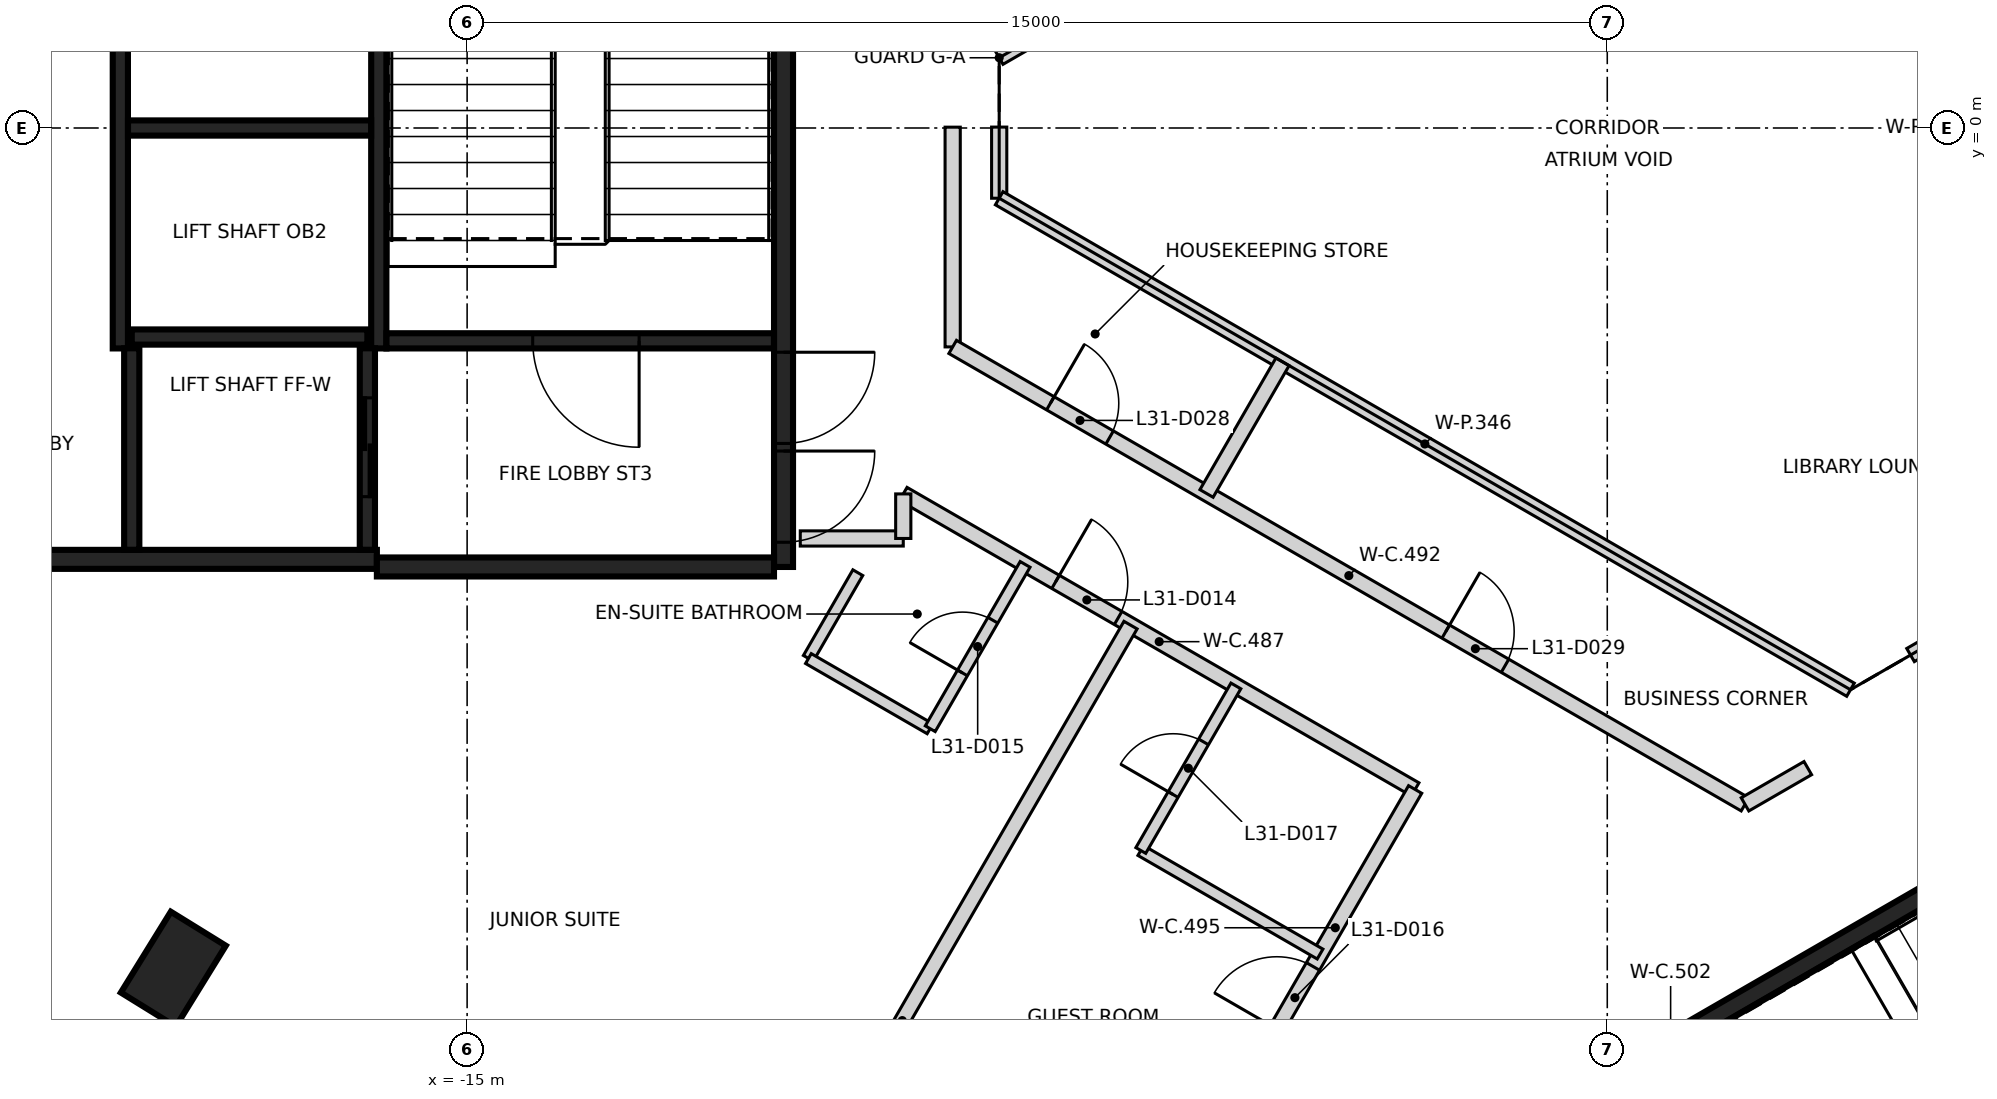
"""IFC4 building model, lengths in metres.
Left out: names, types, materials, properties, quantities, classifications, styles, units other than length and angle.
Written with IfcOpenShell. Run it as: python <this file> out.ifc"""

import sys

from ifc_helpers import new_model, si_unit, direction, frame, frame_2d, origin, origin_2d, place, context, subcontext, project, spatial, rectangle, extrude, element, fill, save


model = new_model("IFC4")
c1 = context("Model", 3, precision=1e-05, world=origin(), true_north=direction((0.0, 1.0)))
c2 = subcontext(c1, "Body", "Model", "MODEL_VIEW")
j1 = project(units=[si_unit("LENGTHUNIT", "METRE"), si_unit("PLANEANGLEUNIT", "RADIAN")], contexts=[c1])
p1 = place(None, origin())
s1 = spatial("IfcSite", under=j1, at=p1, CompositionType="ELEMENT")
p2 = place(p1, origin())
s2 = spatial("IfcBuilding", under=s1, at=p2, CompositionType="ELEMENT")
p3 = place(p2, frame((0.0, 0.0, 128.8)))
s3 = spatial("IfcBuildingStorey", under=s2, at=p3, CompositionType="ELEMENT", Elevation=128.8)
p4 = place(p3, frame((-18.865, -11.066, -0.4), z_axis=(0.0, 0.0, 1.0), x_axis=(0.52567655831, 0.850684522043, 0.0)))
e1 = element("IfcColumn", 1, at=p4, inside=s3, PredefinedType="COLUMN", context=c2, shape_type="SweptSolid", body=[
    extrude(rectangle(XDim=1.25, YDim=0.85, at=origin_2d()), origin(), (0.0, 0.0, 1.0), 3.6),
])
p5 = place(p3, frame((-10.837, 5.775, 0.0), z_axis=(0.0, 0.0, 1.0), x_axis=(0.0, -1.0, 0.0)))
e2 = element("IfcWall", 2, at=p5, inside=s3, PredefinedType="SHEAR", context=c2, shape_type="SweptSolid", body=[
    extrude(rectangle(XDim=11.55, YDim=0.25, at=frame_2d((5.775, 0.0))), origin(), (0.0, 0.0, 1.0), 3.2),
])
p6 = place(p5, frame((10.025, 0.0, 0.0)))
e3 = element("IfcOpeningElement", 3, at=p6, cuts=e2, PredefinedType="OPENING", context=c2, shape_type="SweptSolid", body=[
    extrude(rectangle(XDim=1.2, YDim=2.1, at=frame_2d((0.6, 1.05))), frame((0.0, 0.135, 0.0), z_axis=(0.0, -1.0, 0.0), x_axis=(1.0, 0.0, 0.0)), (0.0, 0.0, 1.0), 0.27),
])
p7 = place(p5, frame((8.725, 0.0, 0.0)))
e4 = element("IfcOpeningElement", 4, at=p7, cuts=e2, PredefinedType="OPENING", context=c2, shape_type="SweptSolid", body=[
    extrude(rectangle(XDim=1.2, YDim=2.1, at=frame_2d((0.6, 1.05))), frame((0.0, 0.135, 0.0), z_axis=(0.0, -1.0, 0.0), x_axis=(1.0, 0.0, 0.0)), (0.0, 0.0, 1.0), 0.27),
])
p8 = place(p3, frame((-16.187, -5.675, 0.0), z_axis=(0.0, 0.0, 1.0), x_axis=(-1.0, 0.0, 0.0)))
e5 = element("IfcWall", 5, at=p8, inside=s3, PredefinedType="SHEAR", context=c2, shape_type="SweptSolid", body=[
    extrude(rectangle(XDim=6.25, YDim=0.25, at=frame_2d((3.125, 0.0))), origin(), (0.0, 0.0, 1.0), 3.2),
])
p9 = place(p3, frame((-10.963, -5.775, 0.0), z_axis=(0.0, 0.0, 1.0), x_axis=(-1.0, 0.0, 0.0)))
e6 = element("IfcWall", 6, at=p9, inside=s3, PredefinedType="SHEAR", context=c2, shape_type="SweptSolid", body=[
    extrude(rectangle(XDim=5.225, YDim=0.25, at=frame_2d((2.612, 0.0))), origin(), (0.0, 0.0, 1.0), 3.2),
])
p10 = place(p3, frame((-16.162, 2.951, 0.0), z_axis=(0.0, 0.0, 1.0), x_axis=(0.0, -1.0, 0.0)))
e7 = element("IfcWall", 7, at=p10, inside=s3, PredefinedType="SHEAR", context=c2, shape_type="SweptSolid", body=[
    extrude(rectangle(XDim=5.851, YDim=0.2, at=frame_2d((2.925, 0.0))), origin(), (0.0, 0.0, 1.0), 3.2),
])
p11 = place(p3, frame((-19.562, -2.9, 0.0), z_axis=(0.0, 0.0, 1.0), x_axis=(0.0, 1.0, 0.0)))
e8 = element("IfcWall", 8, at=p11, inside=s3, PredefinedType="SHEAR", context=c2, shape_type="SweptSolid", body=[
    extrude(rectangle(XDim=6.1, YDim=0.2, at=frame_2d((3.05, 0.0))), origin(), (0.0, 0.0, 1.0), 3.2),
])
p12 = place(p3, frame((-10.963, -2.8, 0.0), z_axis=(0.0, 0.0, 1.0), x_axis=(-1.0, 0.0, 0.0)))
e9 = element("IfcWall", 9, at=p12, inside=s3, PredefinedType="SHEAR", context=c2, shape_type="SweptSolid", body=[
    extrude(rectangle(XDim=5.098, YDim=0.2, at=frame_2d((2.549, 0.0))), origin(), (0.0, 0.0, 1.0), 3.2),
])
p13 = place(p12, frame((1.774, 0.0, 0.0)))
e10 = element("IfcOpeningElement", 10, at=p13, cuts=e9, PredefinedType="OPENING", context=c2, shape_type="SweptSolid", body=[
    extrude(rectangle(XDim=1.4, YDim=2.1, at=frame_2d((0.7, 1.05))), frame((0.0, 0.11, 0.0), z_axis=(0.0, -1.0, 0.0), x_axis=(1.0, 0.0, 0.0)), (0.0, 0.0, 1.0), 0.22),
])
p14 = place(p3, frame((-16.263, 0.0, 0.0), z_axis=(0.0, 0.0, 1.0), x_axis=(-1.0, 0.0, 0.0)))
e11 = element("IfcWall", 11, at=p14, inside=s3, PredefinedType="SHEAR", context=c2, shape_type="SweptSolid", body=[
    extrude(rectangle(XDim=3.198, YDim=0.2, at=frame_2d((1.599, 0.0))), origin(), (0.0, 0.0, 1.0), 3.2),
])
p15 = place(p3, frame((-19.412, -2.75, 0.0), z_axis=(0.0, 0.0, 1.0), x_axis=(1.0, 0.0, 0.0)))
e12 = element("IfcWall", 12, at=p15, inside=s3, PredefinedType="SHEAR", context=c2, shape_type="SweptSolid", body=[
    extrude(rectangle(XDim=3.1, YDim=0.2, at=frame_2d((1.55, 0.0))), origin(), (0.0, 0.0, 1.0), 3.2),
])
p16 = place(p3, frame((-16.312, -2.898, 0.0), z_axis=(0.0, 0.0, 1.0), x_axis=(0.0, -1.0, 0.0)))
e13 = element("IfcWall", 13, at=p16, inside=s3, PredefinedType="SHEAR", context=c2, shape_type="SweptSolid", body=[
    extrude(rectangle(XDim=2.651, YDim=0.2, at=frame_2d((1.325, 0.0))), origin(), (0.0, 0.0, 1.0), 3.2),
])
p17 = place(p16, frame((0.652, 0.0, 0.0)))
e14 = element("IfcOpeningElement", 14, at=p17, cuts=e13, PredefinedType="OPENING", context=c2, shape_type="SweptSolid", body=[
    extrude(rectangle(XDim=1.3, YDim=2.1, at=frame_2d((0.65, 1.05))), frame((0.0, 0.11, 0.0), z_axis=(0.0, -1.0, 0.0), x_axis=(1.0, 0.0, 0.0)), (0.0, 0.0, 1.0), 0.22),
])
p18 = place(p3, frame((-19.412, -5.549, 0.0), z_axis=(0.0, 0.0, 1.0), x_axis=(0.0, 1.0, 0.0)))
e15 = element("IfcWall", 15, at=p18, inside=s3, PredefinedType="SHEAR", context=c2, shape_type="SweptSolid", body=[
    extrude(rectangle(XDim=2.651, YDim=0.2, at=frame_2d((1.325, 0.0))), origin(), (0.0, 0.0, 1.0), 3.2),
])
p19 = place(p3, frame((0.417, -12.273, 0.0), z_axis=(0.0, 0.0, 1.0), x_axis=(0.866021906294, 0.500006057782, 0.0)))
e16 = element("IfcWall", 16, at=p19, inside=s3, PredefinedType="SHEAR", context=c2, shape_type="SweptSolid", body=[
    extrude(rectangle(XDim=11.55, YDim=0.25, at=frame_2d((5.775, 0.0))), origin(), (0.0, 0.0, 1.0), 3.2),
])
p20 = place(p19, frame((10.025, 0.0, 0.0)))
e17 = element("IfcOpeningElement", 17, at=p20, cuts=e16, PredefinedType="OPENING", context=c2, shape_type="SweptSolid", body=[
    extrude(rectangle(XDim=1.2, YDim=2.1, at=frame_2d((0.6, 1.05))), frame((0.0, 0.135, 0.0), z_axis=(0.0, -1.0, 0.0), x_axis=(1.0, 0.0, 0.0)), (0.0, 0.0, 1.0), 0.27),
])
p21 = place(p19, frame((8.725, 0.0, 0.0)))
e18 = element("IfcOpeningElement", 18, at=p21, cuts=e16, PredefinedType="OPENING", context=c2, shape_type="SweptSolid", body=[
    extrude(rectangle(XDim=1.2, YDim=2.1, at=frame_2d((0.6, 1.05))), frame((0.0, 0.135, 0.0), z_axis=(0.0, -1.0, 0.0), x_axis=(1.0, 0.0, 0.0)), (0.0, 0.0, 1.0), 0.27),
])
p22 = place(p3, frame((-10.617, -5.4, 0.0), z_axis=(0.0, 0.0, 1.0), x_axis=(1.0, 0.0, 0.0)))
e19 = element("IfcWall", 19, at=p22, inside=s3, PredefinedType="PARTITIONING", context=c2, shape_type="SweptSolid", body=[
    extrude(rectangle(XDim=1.355, YDim=0.2, at=frame_2d((0.677, 0.0))), origin(), (0.0, 0.0, 1.0), 3.2),
])
p23 = place(p3, frame((-9.262, -4.814, 0.0), z_axis=(0.0, 0.0, 1.0), x_axis=(0.866109782156, -0.499853823887, 0.0)))
e20 = element("IfcWall", 20, at=p23, inside=s3, PredefinedType="PARTITIONING", context=c2, shape_type="SweptSolid", body=[
    extrude(rectangle(XDim=7.776, YDim=0.2, at=frame_2d((3.888, 0.0))), origin(), (0.0, 0.0, 1.0), 3.2),
])
p24 = place(p23, frame((2.314, 0.0, 0.0)))
e21 = element("IfcOpeningElement", 21, at=p24, cuts=e20, PredefinedType="OPENING", context=c2, shape_type="SweptSolid", body=[
    extrude(rectangle(XDim=0.95, YDim=2.1, at=frame_2d((0.475, 1.05))), frame((0.0, 0.11, 0.0), z_axis=(0.0, -1.0, 0.0), x_axis=(1.0, 0.0, 0.0)), (0.0, 0.0, 1.0), 0.22),
])
p25 = place(p3, frame((-9.262, -5.4, 0.0), z_axis=(0.0, 0.0, 1.0), x_axis=(0.0, 1.0, 0.0)))
e22 = element("IfcWall", 22, at=p25, inside=s3, PredefinedType="PARTITIONING", context=c2, shape_type="SweptSolid", body=[
    extrude(rectangle(XDim=0.586, YDim=0.2, at=frame_2d((0.293, 0.0))), origin(), (0.0, 0.0, 1.0), 3.2),
])
p26 = place(p3, frame((-8.612, -2.88, 0.0), z_axis=(0.0, 0.0, 1.0), x_axis=(0.0, 1.0, 0.0)))
e23 = element("IfcWall", 23, at=p26, inside=s3, PredefinedType="PARTITIONING", context=c2, shape_type="SweptSolid", body=[
    extrude(rectangle(XDim=2.891, YDim=0.2, at=frame_2d((1.445, 0.0))), origin(), (0.0, 0.0, 1.0), 2.3),
])
p27 = place(p3, frame((-8.612, -2.88, 0.0), z_axis=(0.0, 0.0, 1.0), x_axis=(0.866035279512, -0.499982894348, 0.0)))
e24 = element("IfcWall", 24, at=p27, inside=s3, PredefinedType="PARTITIONING", context=c2, shape_type="SweptSolid", body=[
    extrude(rectangle(XDim=12.037, YDim=0.2, at=frame_2d((6.018, 0.0))), origin(), (0.0, 0.0, 1.0), 3.2),
])
p28 = place(p27, frame((1.484, 0.0, 0.0)))
e25 = element("IfcOpeningElement", 25, at=p28, cuts=e24, PredefinedType="OPENING", context=c2, shape_type="SweptSolid", body=[
    extrude(rectangle(XDim=0.9, YDim=2.1, at=frame_2d((0.45, 1.05))), frame((0.0, 0.11, 0.0), z_axis=(0.0, -1.0, 0.0), x_axis=(1.0, 0.0, 0.0)), (0.0, 0.0, 1.0), 0.22),
])
p29 = place(p27, frame((7.491, 0.0, 0.0)))
e26 = element("IfcOpeningElement", 26, at=p29, cuts=e24, PredefinedType="OPENING", context=c2, shape_type="SweptSolid", body=[
    extrude(rectangle(XDim=0.9, YDim=2.1, at=frame_2d((0.45, 1.05))), frame((0.0, 0.11, 0.0), z_axis=(0.0, -1.0, 0.0), x_axis=(1.0, 0.0, 0.0)), (0.0, 0.0, 1.0), 0.22),
])
p30 = place(p3, frame((-4.629, -12.341, 0.0), z_axis=(0.0, 0.0, 1.0), x_axis=(0.500069467685, 0.865985292883, 0.0)))
e27 = element("IfcWall", 27, at=p30, inside=s3, PredefinedType="PARTITIONING", context=c2, shape_type="SweptSolid", body=[
    extrude(rectangle(XDim=4.202, YDim=0.2, at=frame_2d((2.101, 0.0))), origin(), (0.0, 0.0, 1.0), 3.2),
])
p31 = place(p30, frame((0.564, 0.0, 0.0)))
e28 = element("IfcOpeningElement", 28, at=p31, cuts=e27, PredefinedType="OPENING", context=c2, shape_type="SweptSolid", body=[
    extrude(rectangle(XDim=0.95, YDim=2.1, at=frame_2d((0.475, 1.05))), frame((0.0, 0.11, 0.0), z_axis=(0.0, -1.0, 0.0), x_axis=(1.0, 0.0, 0.0)), (0.0, 0.0, 1.0), 0.22),
])
p32 = place(p3, frame((1.812, -8.898, 0.0), z_axis=(0.0, 0.0, 1.0), x_axis=(0.866108878364, 0.499855389907, 0.0)))
e29 = element("IfcWall", 29, at=p32, inside=s3, PredefinedType="PARTITIONING", context=c2, shape_type="SweptSolid", body=[
    extrude(rectangle(XDim=0.954, YDim=0.2, at=frame_2d((0.477, 0.0))), origin(), (0.0, 0.0, 1.0), 3.2),
])
p33 = place(p3, frame((-12.278, -16.946, 0.0), z_axis=(0.0, 0.0, 1.0), x_axis=(0.499887212932, 0.866090511637, 0.0)))
e30 = element("IfcWall", 30, at=p33, inside=s3, PredefinedType="PARTITIONING", context=c2, shape_type="SweptSolid", body=[
    extrude(rectangle(XDim=12.015, YDim=0.2, at=frame_2d((6.007, 0.0))), origin(), (0.0, 0.0, 1.0), 3.2),
])
p34 = place(p3, frame((-8.0, 0.924, 0.0), z_axis=(0.0, 0.0, 1.0), x_axis=(0.86604129137, 0.499972480886, 0.0)))
e31 = element("IfcWall", 31, at=p34, inside=s3, PredefinedType="PARTITIONING", context=c2, shape_type="SweptSolid", body=[
    extrude(rectangle(XDim=12.932, YDim=0.2, at=frame_2d((6.466, 0.0))), origin(), (0.0, 0.0, 1.0), 2.3),
])
p35 = place(p3, frame((-8.0, -0.924, 0.0), z_axis=(0.0, 0.0, 1.0), x_axis=(0.0, 1.0, 0.0)))
e32 = element("IfcWall", 32, at=p35, inside=s3, PredefinedType="PARTITIONING", context=c2, shape_type="SweptSolid", body=[
    extrude(rectangle(XDim=0.936, YDim=0.2, at=frame_2d((0.468, 0.0))), origin(), (0.0, 0.0, 1.0), 2.3),
])
p36 = place(p3, frame((-8.0, -0.924, 0.0), z_axis=(0.0, 0.0, 1.0), x_axis=(0.86604129137, -0.499972480886, 0.0)))
e33 = element("IfcWall", 33, at=p36, inside=s3, PredefinedType="PARTITIONING", context=c2, shape_type="SweptSolid", body=[
    extrude(rectangle(XDim=12.932, YDim=0.2, at=frame_2d((6.466, 0.0))), origin(), (0.0, 0.0, 1.0), 2.3),
])
p37 = place(p3, frame((-5.272, -4.808, 0.0), z_axis=(0.0, 0.0, 1.0), x_axis=(0.499880961361, 0.866094119867, 0.0)))
e34 = element("IfcWall", 34, at=p37, inside=s3, PredefinedType="PARTITIONING", context=c2, shape_type="SweptSolid", body=[
    extrude(rectangle(XDim=2.0, YDim=0.2, at=frame_2d((1.0, 0.0))), origin(), (0.0, 0.0, 1.0), 2.3),
])
p38 = place(p3, frame((3.99, -6.934, 0.0), z_axis=(0.0, 0.0, 1.0), x_axis=(0.865872609263, 0.500264554538, 0.0)))
e35 = element("IfcWall", 35, at=p38, inside=s3, PredefinedType="PARTITIONING", context=c2, shape_type="SweptSolid", body=[
    extrude(rectangle(XDim=0.936, YDim=0.2, at=frame_2d((0.468, 0.0))), origin(), (0.0, 0.0, 1.0), 2.3),
])
p39 = place(p3, frame((-10.511, -6.977, 0.0), z_axis=(0.0, 0.0, 1.0), x_axis=(0.500274472704, 0.865866878891, 0.0)))
e36 = element("IfcWall", 36, at=p39, inside=s3, PredefinedType="PARTITIONING", context=c2, shape_type="SweptSolid", body=[
    extrude(rectangle(XDim=1.302, YDim=0.15, at=frame_2d((0.651, 0.0))), origin(), (0.0, 0.0, 1.0), 3.2),
])
p40 = place(p3, frame((-10.51, -6.98, 0.0), z_axis=(0.0, 0.0, 1.0), x_axis=(0.865965533559, -0.500103683937, 0.0)))
e37 = element("IfcWall", 37, at=p40, inside=s3, PredefinedType="PARTITIONING", context=c2, shape_type="SweptSolid", body=[
    extrude(rectangle(XDim=1.848, YDim=0.15, at=frame_2d((0.924, 0.0))), origin(), (0.0, 0.0, 1.0), 3.2),
])
p41 = place(p3, frame((-8.907, -7.903, 0.0), z_axis=(0.0, 0.0, 1.0), x_axis=(0.499925626596, 0.866068339032, 0.0)))
e38 = element("IfcWall", 38, at=p41, inside=s3, PredefinedType="PARTITIONING", context=c2, shape_type="SweptSolid", body=[
    extrude(rectangle(XDim=2.497, YDim=0.15, at=frame_2d((1.248, 0.0))), origin(), (0.0, 0.0, 1.0), 3.2),
])
p42 = place(p41, frame((0.848, 0.0, 0.0)))
e39 = element("IfcOpeningElement", 39, at=p42, cuts=e38, PredefinedType="OPENING", context=c2, shape_type="SweptSolid", body=[
    extrude(rectangle(XDim=0.8, YDim=2.1, at=frame_2d((0.4, 1.05))), frame((0.0, 0.085, 0.0), z_axis=(0.0, -1.0, 0.0), x_axis=(1.0, 0.0, 0.0)), (0.0, 0.0, 1.0), 0.17),
])
p43 = place(p3, frame((-6.137, -9.505, 0.0), z_axis=(0.0, 0.0, 1.0), x_axis=(0.866000497904, -0.50004313577, 0.0)))
e40 = element("IfcWall", 40, at=p43, inside=s3, PredefinedType="PARTITIONING", context=c2, shape_type="SweptSolid", body=[
    extrude(rectangle(XDim=2.724, YDim=0.15, at=frame_2d((1.362, 0.0))), origin(), (0.0, 0.0, 1.0), 3.2),
])
p44 = place(p3, frame((-6.137, -9.505, 0.0), z_axis=(0.0, 0.0, 1.0), x_axis=(0.500339416332, 0.86582935297, 0.0)))
e41 = element("IfcWall", 41, at=p44, inside=s3, PredefinedType="PARTITIONING", context=c2, shape_type="SweptSolid", body=[
    extrude(rectangle(XDim=2.5, YDim=0.15, at=frame_2d((1.25, 0.0))), origin(), (0.0, 0.0, 1.0), 3.2),
])
p45 = place(p44, frame((0.85, 0.0, 0.0)))
e42 = element("IfcOpeningElement", 42, at=p45, cuts=e41, PredefinedType="OPENING", context=c2, shape_type="SweptSolid", body=[
    extrude(rectangle(XDim=0.8, YDim=2.1, at=frame_2d((0.4, 1.05))), frame((0.0, 0.085, 0.0), z_axis=(0.0, -1.0, 0.0), x_axis=(1.0, 0.0, 0.0)), (0.0, 0.0, 1.0), 0.17),
])
p46 = place(p17, origin())
e43 = element("IfcDoor", 43, at=p46, inside=s3, OperationType="SLIDING_TO_LEFT", PredefinedType="DOOR", context=c2, shape_type="SweptSolid", body=[
    extrude(rectangle(XDim=1.3, YDim=2.1, at=frame_2d((0.65, 1.05))), frame((0.0, 0.025, 0.0), z_axis=(0.0, -1.0, 0.0), x_axis=(1.0, 0.0, 0.0)), (0.0, 0.0, 1.0), 0.05),
])
fill(e14, e43)
p47 = place(p6, origin())
e44 = element("IfcDoor", 44, at=p47, inside=s3, OperationType="SINGLE_SWING_LEFT", PredefinedType="DOOR", context=c2, shape_type="SweptSolid", body=[
    extrude(rectangle(XDim=1.2, YDim=2.1, at=frame_2d((0.6, 1.05))), frame((0.0, 0.025, 0.0), z_axis=(0.0, -1.0, 0.0), x_axis=(1.0, 0.0, 0.0)), (0.0, 0.0, 1.0), 0.05),
])
fill(e3, e44)
p48 = place(p7, origin())
e45 = element("IfcDoor", 45, at=p48, inside=s3, OperationType="SINGLE_SWING_RIGHT", PredefinedType="DOOR", context=c2, shape_type="SweptSolid", body=[
    extrude(rectangle(XDim=1.2, YDim=2.1, at=frame_2d((0.6, 1.05))), frame((0.0, 0.025, 0.0), z_axis=(0.0, -1.0, 0.0), x_axis=(1.0, 0.0, 0.0)), (0.0, 0.0, 1.0), 0.05),
])
fill(e4, e45)
p49 = place(p13, origin())
e46 = element("IfcDoor", 46, at=p49, inside=s3, OperationType="SINGLE_SWING_LEFT", PredefinedType="DOOR", context=c2, shape_type="SweptSolid", body=[
    extrude(rectangle(XDim=1.4, YDim=2.1, at=frame_2d((0.7, 1.05))), frame((0.0, 0.025, 0.0), z_axis=(0.0, -1.0, 0.0), x_axis=(1.0, 0.0, 0.0)), (0.0, 0.0, 1.0), 0.05),
])
fill(e10, e46)
p50 = place(p24, frame((0.95, 0.0, 0.0), z_axis=(0.0, 0.0, 1.0), x_axis=(-1.0, 0.0, 0.0)))
e47 = element("IfcDoor", 47, at=p50, inside=s3, OperationType="SINGLE_SWING_LEFT", PredefinedType="DOOR", context=c2, shape_type="SweptSolid", body=[
    extrude(rectangle(XDim=0.95, YDim=2.1, at=frame_2d((0.475, 1.05))), frame((0.0, 0.025, 0.0), z_axis=(0.0, -1.0, 0.0), x_axis=(1.0, 0.0, 0.0)), (0.0, 0.0, 1.0), 0.05),
])
fill(e21, e47)
p51 = place(p42, origin())
e48 = element("IfcDoor", 48, at=p51, inside=s3, OperationType="SINGLE_SWING_LEFT", PredefinedType="DOOR", context=c2, shape_type="SweptSolid", body=[
    extrude(rectangle(XDim=0.8, YDim=2.1, at=frame_2d((0.4, 1.05))), frame((0.0, 0.025, 0.0), z_axis=(0.0, -1.0, 0.0), x_axis=(1.0, 0.0, 0.0)), (0.0, 0.0, 1.0), 0.05),
])
fill(e39, e48)
p52 = place(p31, origin())
e49 = element("IfcDoor", 49, at=p52, inside=s3, OperationType="SINGLE_SWING_LEFT", PredefinedType="DOOR", context=c2, shape_type="SweptSolid", body=[
    extrude(rectangle(XDim=0.95, YDim=2.1, at=frame_2d((0.475, 1.05))), frame((0.0, 0.025, 0.0), z_axis=(0.0, -1.0, 0.0), x_axis=(1.0, 0.0, 0.0)), (0.0, 0.0, 1.0), 0.05),
])
fill(e28, e49)
p53 = place(p45, frame((0.8, 0.0, 0.0), z_axis=(0.0, 0.0, 1.0), x_axis=(-1.0, 0.0, 0.0)))
e50 = element("IfcDoor", 50, at=p53, inside=s3, OperationType="SINGLE_SWING_LEFT", PredefinedType="DOOR", context=c2, shape_type="SweptSolid", body=[
    extrude(rectangle(XDim=0.8, YDim=2.1, at=frame_2d((0.4, 1.05))), frame((0.0, 0.025, 0.0), z_axis=(0.0, -1.0, 0.0), x_axis=(1.0, 0.0, 0.0)), (0.0, 0.0, 1.0), 0.05),
])
fill(e42, e50)
p54 = place(p28, origin())
e51 = element("IfcDoor", 51, at=p54, inside=s3, OperationType="SINGLE_SWING_LEFT", PredefinedType="DOOR", context=c2, shape_type="SweptSolid", body=[
    extrude(rectangle(XDim=0.9, YDim=2.1, at=frame_2d((0.45, 1.05))), frame((0.0, 0.025, 0.0), z_axis=(0.0, -1.0, 0.0), x_axis=(1.0, 0.0, 0.0)), (0.0, 0.0, 1.0), 0.05),
])
fill(e25, e51)
p55 = place(p29, origin())
e52 = element("IfcDoor", 52, at=p55, inside=s3, OperationType="SINGLE_SWING_LEFT", PredefinedType="DOOR", context=c2, shape_type="SweptSolid", body=[
    extrude(rectangle(XDim=0.9, YDim=2.1, at=frame_2d((0.45, 1.05))), frame((0.0, 0.025, 0.0), z_axis=(0.0, -1.0, 0.0), x_axis=(1.0, 0.0, 0.0)), (0.0, 0.0, 1.0), 0.05),
])
fill(e26, e52)
save(model, sys.argv[1])
